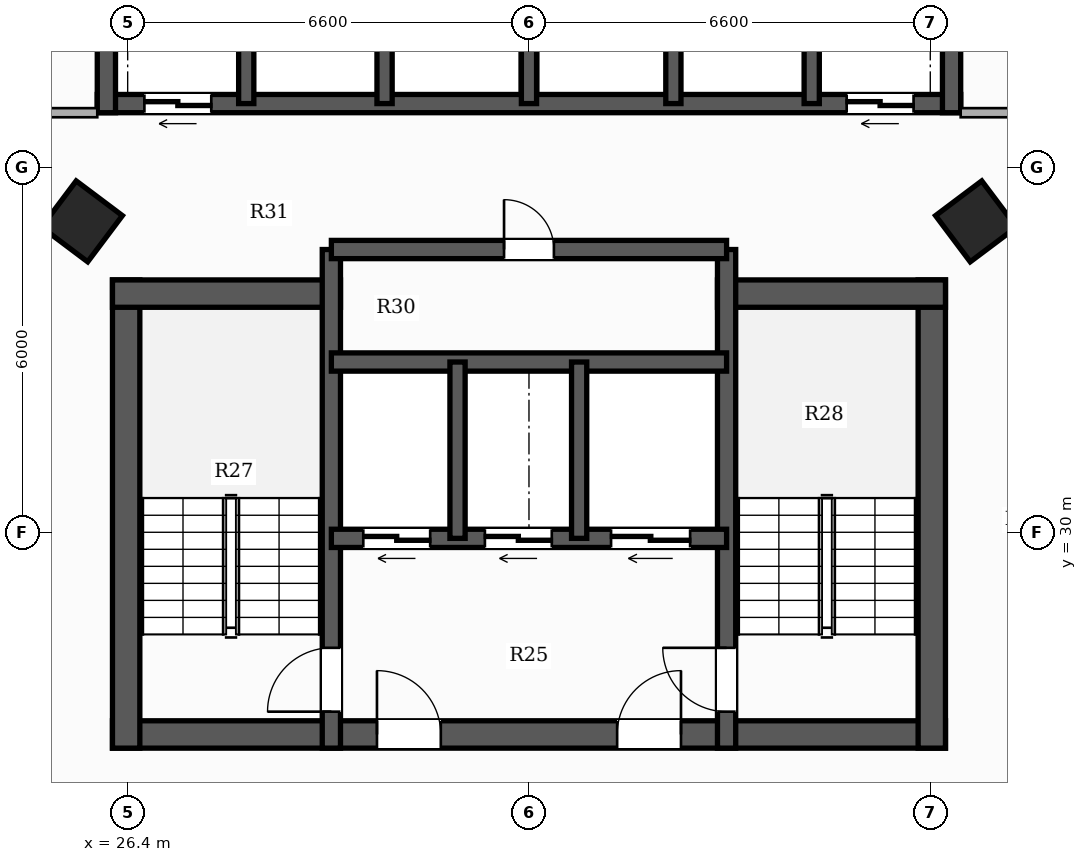
"""IFC4 building model, lengths in metres.
Left out: names, types, materials, properties, quantities, classifications, styles, units other than length and angle.
Written with IfcOpenShell. Run it as: python <this file> out.ifc"""

import sys

from ifc_helpers import new_model, si_unit, direction, frame, frame_2d, origin, origin_2d, place, context, subcontext, project, spatial, rectangle, hollow_rectangle, extrude, element, fill, save


model = new_model("IFC4")
c1 = context("Model", 3, precision=1e-05, world=origin(), true_north=direction((0.0, 1.0)))
c2 = subcontext(c1, "Body", "Model", "MODEL_VIEW")
j1 = project(units=[si_unit("LENGTHUNIT", "METRE"), si_unit("PLANEANGLEUNIT", "RADIAN")], contexts=[c1])
p1 = place(None, origin())
s1 = spatial("IfcSite", under=j1, at=p1, CompositionType="ELEMENT")
p2 = place(p1, origin())
s2 = spatial("IfcBuilding", under=s1, at=p2, CompositionType="ELEMENT")
p3 = place(p2, frame((0.0, 0.0, 80.75)))
s3 = spatial("IfcBuildingStorey", under=s2, at=p3, CompositionType="ELEMENT", Elevation=80.75)
p4 = place(p3, frame((26.15, 26.675, 0.0), z_axis=(0.0, 0.0, 1.0), x_axis=(1.0, 0.0, 0.0)))
e1 = element("IfcWall", 1, at=p4, inside=s3, PredefinedType="SHEAR", context=c2, shape_type="SweptSolid", body=[
    extrude(rectangle(XDim=13.7, YDim=0.45, at=frame_2d((6.85, 0.0))), origin(), (0.0, 0.0, 1.0), 3.3),
])
p5 = place(p4, frame((4.35, 0.0, 0.0)))
e2 = element("IfcOpeningElement", 2, at=p5, cuts=e1, PredefinedType="OPENING", context=c2, shape_type="SweptSolid", body=[
    extrude(rectangle(XDim=1.05, YDim=2.15, at=frame_2d((0.525, 1.075))), frame((0.0, 0.235, 0.0), z_axis=(0.0, -1.0, 0.0), x_axis=(1.0, 0.0, 0.0)), (0.0, 0.0, 1.0), 0.47),
])
p6 = place(p4, frame((8.3, 0.0, 0.0)))
e3 = element("IfcOpeningElement", 3, at=p6, cuts=e1, PredefinedType="OPENING", context=c2, shape_type="SweptSolid", body=[
    extrude(rectangle(XDim=1.05, YDim=2.15, at=frame_2d((0.525, 1.075))), frame((0.0, 0.235, 0.0), z_axis=(0.0, -1.0, 0.0), x_axis=(1.0, 0.0, 0.0)), (0.0, 0.0, 1.0), 0.47),
])
p7 = place(p3, frame((26.375, 26.45, 0.0), z_axis=(0.0, 0.0, 1.0), x_axis=(0.0, 1.0, 0.0)))
e4 = element("IfcWall", 4, at=p7, inside=s3, PredefinedType="SHEAR", context=c2, shape_type="SweptSolid", body=[
    extrude(rectangle(XDim=7.7, YDim=0.45, at=frame_2d((3.85, 0.0))), origin(), (0.0, 0.0, 1.0), 3.3),
])
p8 = place(p3, frame((26.15, 33.925, 0.0), z_axis=(0.0, 0.0, 1.0), x_axis=(1.0, 0.0, 0.0)))
e5 = element("IfcWall", 5, at=p8, inside=s3, PredefinedType="SHEAR", context=c2, shape_type="SweptSolid", body=[
    extrude(rectangle(XDim=3.75, YDim=0.45, at=frame_2d((1.875, 0.0))), origin(), (0.0, 0.0, 1.0), 3.3),
])
p9 = place(p3, frame((39.625, 26.45, 0.0), z_axis=(0.0, 0.0, 1.0), x_axis=(0.0, 1.0, 0.0)))
e6 = element("IfcWall", 6, at=p9, inside=s3, PredefinedType="SHEAR", context=c2, shape_type="SweptSolid", body=[
    extrude(rectangle(XDim=7.7, YDim=0.45, at=frame_2d((3.85, 0.0))), origin(), (0.0, 0.0, 1.0), 3.3),
])
p10 = place(p3, frame((36.1, 33.925, 0.0), z_axis=(0.0, 0.0, 1.0), x_axis=(1.0, 0.0, 0.0)))
e7 = element("IfcWall", 7, at=p10, inside=s3, PredefinedType="SHEAR", context=c2, shape_type="SweptSolid", body=[
    extrude(rectangle(XDim=3.75, YDim=0.45, at=frame_2d((1.875, 0.0))), origin(), (0.0, 0.0, 1.0), 3.3),
])
p11 = place(p3, frame((29.75, 26.45, 0.0), z_axis=(0.0, 0.0, 1.0), x_axis=(0.0, 1.0, 0.0)))
e8 = element("IfcWall", 8, at=p11, inside=s3, PredefinedType="SHEAR", context=c2, shape_type="SweptSolid", body=[
    extrude(rectangle(XDim=8.2, YDim=0.3, at=frame_2d((4.1, 0.0))), origin(), (0.0, 0.0, 1.0), 3.3),
])
p12 = place(p11, frame((0.6, 0.0, 0.0)))
e9 = element("IfcOpeningElement", 9, at=p12, cuts=e8, PredefinedType="OPENING", context=c2, shape_type="SweptSolid", body=[
    extrude(rectangle(XDim=1.05, YDim=2.15, at=frame_2d((0.525, 1.075))), frame((0.0, 0.16, 0.0), z_axis=(0.0, -1.0, 0.0), x_axis=(1.0, 0.0, 0.0)), (0.0, 0.0, 1.0), 0.32),
])
p13 = place(p3, frame((36.25, 26.45, 0.0), z_axis=(0.0, 0.0, 1.0), x_axis=(0.0, 1.0, 0.0)))
e10 = element("IfcWall", 10, at=p13, inside=s3, PredefinedType="SHEAR", context=c2, shape_type="SweptSolid", body=[
    extrude(rectangle(XDim=8.2, YDim=0.3, at=frame_2d((4.1, 0.0))), origin(), (0.0, 0.0, 1.0), 3.3),
])
p14 = place(p13, frame((0.6, 0.0, 0.0)))
e11 = element("IfcOpeningElement", 11, at=p14, cuts=e10, PredefinedType="OPENING", context=c2, shape_type="SweptSolid", body=[
    extrude(rectangle(XDim=1.05, YDim=2.15, at=frame_2d((0.525, 1.075))), frame((0.0, 0.16, 0.0), z_axis=(0.0, -1.0, 0.0), x_axis=(1.0, 0.0, 0.0)), (0.0, 0.0, 1.0), 0.32),
])
p15 = place(p3, frame((36.25, 29.9, 0.0), z_axis=(0.0, 0.0, 1.0), x_axis=(-1.0, 0.0, 0.0)))
e12 = element("IfcWall", 12, at=p15, inside=s3, PredefinedType="SHEAR", context=c2, shape_type="SweptSolid", body=[
    extrude(rectangle(XDim=6.5, YDim=0.3, at=frame_2d((3.25, 0.0))), origin(), (0.0, 0.0, 1.0), 3.3),
])
p16 = place(p15, frame((4.875, 0.0, 0.0)))
e13 = element("IfcOpeningElement", 13, at=p16, cuts=e12, PredefinedType="OPENING", context=c2, shape_type="SweptSolid", body=[
    extrude(rectangle(XDim=1.1, YDim=2.2, at=frame_2d((0.55, 1.1))), frame((0.0, 0.16, 0.0), z_axis=(0.0, -1.0, 0.0), x_axis=(1.0, 0.0, 0.0)), (0.0, 0.0, 1.0), 0.32),
])
p17 = place(p15, frame((2.875, 0.0, 0.0)))
e14 = element("IfcOpeningElement", 14, at=p17, cuts=e12, PredefinedType="OPENING", context=c2, shape_type="SweptSolid", body=[
    extrude(rectangle(XDim=1.1, YDim=2.2, at=frame_2d((0.55, 1.1))), frame((0.0, 0.16, 0.0), z_axis=(0.0, -1.0, 0.0), x_axis=(1.0, 0.0, 0.0)), (0.0, 0.0, 1.0), 0.32),
])
p18 = place(p15, frame((0.6, 0.0, 0.0)))
e15 = element("IfcOpeningElement", 15, at=p18, cuts=e12, PredefinedType="OPENING", context=c2, shape_type="SweptSolid", body=[
    extrude(rectangle(XDim=1.3, YDim=2.2, at=frame_2d((0.65, 1.1))), frame((0.0, 0.16, 0.0), z_axis=(0.0, -1.0, 0.0), x_axis=(1.0, 0.0, 0.0)), (0.0, 0.0, 1.0), 0.32),
])
p19 = place(p3, frame((29.75, 32.8, 0.0), z_axis=(0.0, 0.0, 1.0), x_axis=(1.0, 0.0, 0.0)))
e16 = element("IfcWall", 16, at=p19, inside=s3, PredefinedType="SHEAR", context=c2, shape_type="SweptSolid", body=[
    extrude(rectangle(XDim=6.5, YDim=0.3, at=frame_2d((3.25, 0.0))), origin(), (0.0, 0.0, 1.0), 3.3),
])
for number, where, z_axis, x_axis in (
    (17, (31.825, 29.9, 0.0), (0.0, 0.0, 1.0), (0.0, 1.0, 0.0)),
    (18, (33.825, 29.9, 0.0), (0.0, 0.0, 1.0), (0.0, 1.0, 0.0)),
):
    element("IfcWall", number, at=place(p3, frame(where, z_axis=z_axis, x_axis=x_axis)), inside=s3, PredefinedType="SHEAR", context=c2, shape_type="SweptSolid", body=[
        extrude(rectangle(XDim=2.9, YDim=0.25, at=frame_2d((1.45, 0.0))), origin(), (0.0, 0.0, 1.0), 3.3),
    ])
p20 = place(p3, frame((29.75, 34.65, 0.0), z_axis=(0.0, 0.0, 1.0), x_axis=(1.0, 0.0, 0.0)))
e19 = element("IfcWall", 19, at=p20, inside=s3, PredefinedType="SHEAR", context=c2, shape_type="SweptSolid", body=[
    extrude(rectangle(XDim=6.5, YDim=0.3, at=frame_2d((3.25, 0.0))), origin(), (0.0, 0.0, 1.0), 3.3),
])
p21 = place(p20, frame((2.84, 0.0, 0.0)))
e20 = element("IfcOpeningElement", 20, at=p21, cuts=e19, PredefinedType="OPENING", context=c2, shape_type="SweptSolid", body=[
    extrude(rectangle(XDim=0.82, YDim=2.1, at=frame_2d((0.41, 1.05))), frame((0.0, 0.16, 0.0), z_axis=(0.0, -1.0, 0.0), x_axis=(1.0, 0.0, 0.0)), (0.0, 0.0, 1.0), 0.32),
])
p22 = place(p3, frame((40.1, 37.05, 0.0), z_axis=(0.0, 0.0, 1.0), x_axis=(-1.0, 0.0, 0.0)))
e21 = element("IfcWall", 21, at=p22, inside=s3, PredefinedType="SHEAR", context=c2, shape_type="SweptSolid", body=[
    extrude(rectangle(XDim=14.2, YDim=0.3, at=frame_2d((7.1, 0.0))), origin(), (0.0, 0.0, 1.0), 3.3),
])
p23 = place(p22, frame((12.325, 0.0, 0.0)))
e22 = element("IfcOpeningElement", 22, at=p23, cuts=e21, PredefinedType="OPENING", context=c2, shape_type="SweptSolid", body=[
    extrude(rectangle(XDim=1.1, YDim=2.2, at=frame_2d((0.55, 1.1))), frame((0.0, 0.16, 0.0), z_axis=(0.0, -1.0, 0.0), x_axis=(1.0, 0.0, 0.0)), (0.0, 0.0, 1.0), 0.32),
])
p24 = place(p22, frame((0.775, 0.0, 0.0)))
e23 = element("IfcOpeningElement", 23, at=p24, cuts=e21, PredefinedType="OPENING", context=c2, shape_type="SweptSolid", body=[
    extrude(rectangle(XDim=1.1, YDim=2.2, at=frame_2d((0.55, 1.1))), frame((0.0, 0.16, 0.0), z_axis=(0.0, -1.0, 0.0), x_axis=(1.0, 0.0, 0.0)), (0.0, 0.0, 1.0), 0.32),
])
for number, where, z_axis, x_axis in (
    (24, (26.05, 36.9, 0.0), (0.0, 0.0, 1.0), (0.0, 1.0, 0.0)),
    (25, (39.95, 36.9, 0.0), (0.0, 0.0, 1.0), (0.0, 1.0, 0.0)),
):
    element("IfcWall", number, at=place(p3, frame(where, z_axis=z_axis, x_axis=x_axis)), inside=s3, PredefinedType="SHEAR", context=c2, shape_type="SweptSolid", body=[
        extrude(rectangle(XDim=2.85, YDim=0.3, at=frame_2d((1.425, 0.0))), origin(), (0.0, 0.0, 1.0), 3.3),
    ])
for number, where, z_axis, x_axis in (
    (26, (28.35, 37.05, 0.0), (0.0, 0.0, 1.0), (0.0, 1.0, 0.0)),
    (27, (30.625, 37.05, 0.0), (0.0, 0.0, 1.0), (0.0, 1.0, 0.0)),
    (28, (33.0, 37.05, 0.0), (0.0, 0.0, 1.0), (0.0, 1.0, 0.0)),
    (29, (35.375, 37.05, 0.0), (0.0, 0.0, 1.0), (0.0, 1.0, 0.0)),
    (30, (37.65, 37.05, 0.0), (0.0, 0.0, 1.0), (0.0, 1.0, 0.0)),
):
    element("IfcWall", number, at=place(p3, frame(where, z_axis=z_axis, x_axis=x_axis)), inside=s3, PredefinedType="SHEAR", context=c2, shape_type="SweptSolid", body=[
        extrude(rectangle(XDim=2.55, YDim=0.25, at=frame_2d((1.275, 0.0))), origin(), (0.0, 0.0, 1.0), 3.3),
    ])
for number, where, z_axis, x_axis in (
    (31, (25.648, 35.113, 0.0), (0.0, 0.0, 1.0), (0.6, 0.8, 0.0)),
    (32, (40.352, 35.113, 0.0), (0.0, 0.0, 1.0), (-0.6, 0.8, 0.0)),
):
    element("IfcColumn", number, at=place(p3, frame(where, z_axis=z_axis, x_axis=x_axis)), inside=s3, PredefinedType="COLUMN", context=c2, shape_type="SweptSolid", body=[
        extrude(hollow_rectangle(XDim=0.95, YDim=0.95, WallThickness=0.032, at=origin_2d()), origin(), (0.0, 0.0, 1.0), 3.3),
    ])
p25 = place(p3, frame((40.1, 36.9, 0.0), z_axis=(0.0, 0.0, 1.0), x_axis=(1.0, 0.0, 0.0)))
e33 = element("IfcWall", 33, at=p25, inside=s3, PredefinedType="PARTITIONING", context=c2, shape_type="SweptSolid", body=[
    extrude(rectangle(XDim=2.55, YDim=0.15, at=frame_2d((1.275, 0.0))), origin(), (0.0, 0.0, 1.0), 2.413),
])
p26 = place(p3, frame((23.41, 36.9, 0.0), z_axis=(0.0, 0.0, 1.0), x_axis=(1.0, 0.0, 0.0)))
e34 = element("IfcWall", 34, at=p26, inside=s3, PredefinedType="PARTITIONING", context=c2, shape_type="SweptSolid", body=[
    extrude(rectangle(XDim=2.49, YDim=0.15, at=frame_2d((1.245, 0.0))), origin(), (0.0, 0.0, 1.0), 2.413),
])
p27 = place(p12, origin())
e35 = element("IfcDoor", 35, at=p27, inside=s3, OperationType="SINGLE_SWING_LEFT", PredefinedType="DOOR", context=c2, shape_type="SweptSolid", body=[
    extrude(rectangle(XDim=1.05, YDim=2.15, at=frame_2d((0.525, 1.075))), frame((0.0, 0.025, 0.0), z_axis=(0.0, -1.0, 0.0), x_axis=(1.0, 0.0, 0.0)), (0.0, 0.0, 1.0), 0.05),
])
fill(e9, e35)
p28 = place(p14, origin())
e36 = element("IfcDoor", 36, at=p28, inside=s3, OperationType="SINGLE_SWING_RIGHT", PredefinedType="DOOR", context=c2, shape_type="SweptSolid", body=[
    extrude(rectangle(XDim=1.05, YDim=2.15, at=frame_2d((0.525, 1.075))), frame((0.0, 0.025, 0.0), z_axis=(0.0, -1.0, 0.0), x_axis=(1.0, 0.0, 0.0)), (0.0, 0.0, 1.0), 0.05),
])
fill(e11, e36)
p29 = place(p5, origin())
e37 = element("IfcDoor", 37, at=p29, inside=s3, OperationType="SINGLE_SWING_LEFT", PredefinedType="DOOR", context=c2, shape_type="SweptSolid", body=[
    extrude(rectangle(XDim=1.05, YDim=2.15, at=frame_2d((0.525, 1.075))), frame((0.0, 0.025, 0.0), z_axis=(0.0, -1.0, 0.0), x_axis=(1.0, 0.0, 0.0)), (0.0, 0.0, 1.0), 0.05),
])
fill(e2, e37)
p30 = place(p6, origin())
e38 = element("IfcDoor", 38, at=p30, inside=s3, OperationType="SINGLE_SWING_RIGHT", PredefinedType="DOOR", context=c2, shape_type="SweptSolid", body=[
    extrude(rectangle(XDim=1.05, YDim=2.15, at=frame_2d((0.525, 1.075))), frame((0.0, 0.025, 0.0), z_axis=(0.0, -1.0, 0.0), x_axis=(1.0, 0.0, 0.0)), (0.0, 0.0, 1.0), 0.05),
])
fill(e3, e38)
p31 = place(p16, origin())
e39 = element("IfcDoor", 39, at=p31, inside=s3, OperationType="DOUBLE_DOOR_SLIDING", PredefinedType="DOOR", context=c2, shape_type="SweptSolid", body=[
    extrude(rectangle(XDim=1.1, YDim=2.2, at=frame_2d((0.55, 1.1))), frame((0.0, 0.025, 0.0), z_axis=(0.0, -1.0, 0.0), x_axis=(1.0, 0.0, 0.0)), (0.0, 0.0, 1.0), 0.05),
])
fill(e13, e39)
p32 = place(p17, origin())
e40 = element("IfcDoor", 40, at=p32, inside=s3, OperationType="DOUBLE_DOOR_SLIDING", PredefinedType="DOOR", context=c2, shape_type="SweptSolid", body=[
    extrude(rectangle(XDim=1.1, YDim=2.2, at=frame_2d((0.55, 1.1))), frame((0.0, 0.025, 0.0), z_axis=(0.0, -1.0, 0.0), x_axis=(1.0, 0.0, 0.0)), (0.0, 0.0, 1.0), 0.05),
])
fill(e14, e40)
p33 = place(p18, origin())
e41 = element("IfcDoor", 41, at=p33, inside=s3, OperationType="DOUBLE_DOOR_SLIDING", PredefinedType="DOOR", context=c2, shape_type="SweptSolid", body=[
    extrude(rectangle(XDim=1.3, YDim=2.2, at=frame_2d((0.65, 1.1))), frame((0.0, 0.025, 0.0), z_axis=(0.0, -1.0, 0.0), x_axis=(1.0, 0.0, 0.0)), (0.0, 0.0, 1.0), 0.05),
])
fill(e15, e41)
p34 = place(p23, origin())
e42 = element("IfcDoor", 42, at=p34, inside=s3, OperationType="DOUBLE_DOOR_SLIDING", PredefinedType="DOOR", context=c2, shape_type="SweptSolid", body=[
    extrude(rectangle(XDim=1.1, YDim=2.2, at=frame_2d((0.55, 1.1))), frame((0.0, 0.025, 0.0), z_axis=(0.0, -1.0, 0.0), x_axis=(1.0, 0.0, 0.0)), (0.0, 0.0, 1.0), 0.05),
])
fill(e22, e42)
p35 = place(p24, origin())
e43 = element("IfcDoor", 43, at=p35, inside=s3, OperationType="DOUBLE_DOOR_SLIDING", PredefinedType="DOOR", context=c2, shape_type="SweptSolid", body=[
    extrude(rectangle(XDim=1.1, YDim=2.2, at=frame_2d((0.55, 1.1))), frame((0.0, 0.025, 0.0), z_axis=(0.0, -1.0, 0.0), x_axis=(1.0, 0.0, 0.0)), (0.0, 0.0, 1.0), 0.05),
])
fill(e23, e43)
p36 = place(p21, origin())
e44 = element("IfcDoor", 44, at=p36, inside=s3, OperationType="SINGLE_SWING_LEFT", PredefinedType="DOOR", context=c2, shape_type="SweptSolid", body=[
    extrude(rectangle(XDim=0.82, YDim=2.1, at=frame_2d((0.41, 1.05))), frame((0.0, 0.025, 0.0), z_axis=(0.0, -1.0, 0.0), x_axis=(1.0, 0.0, 0.0)), (0.0, 0.0, 1.0), 0.05),
])
fill(e20, e44)
save(model, sys.argv[1])
